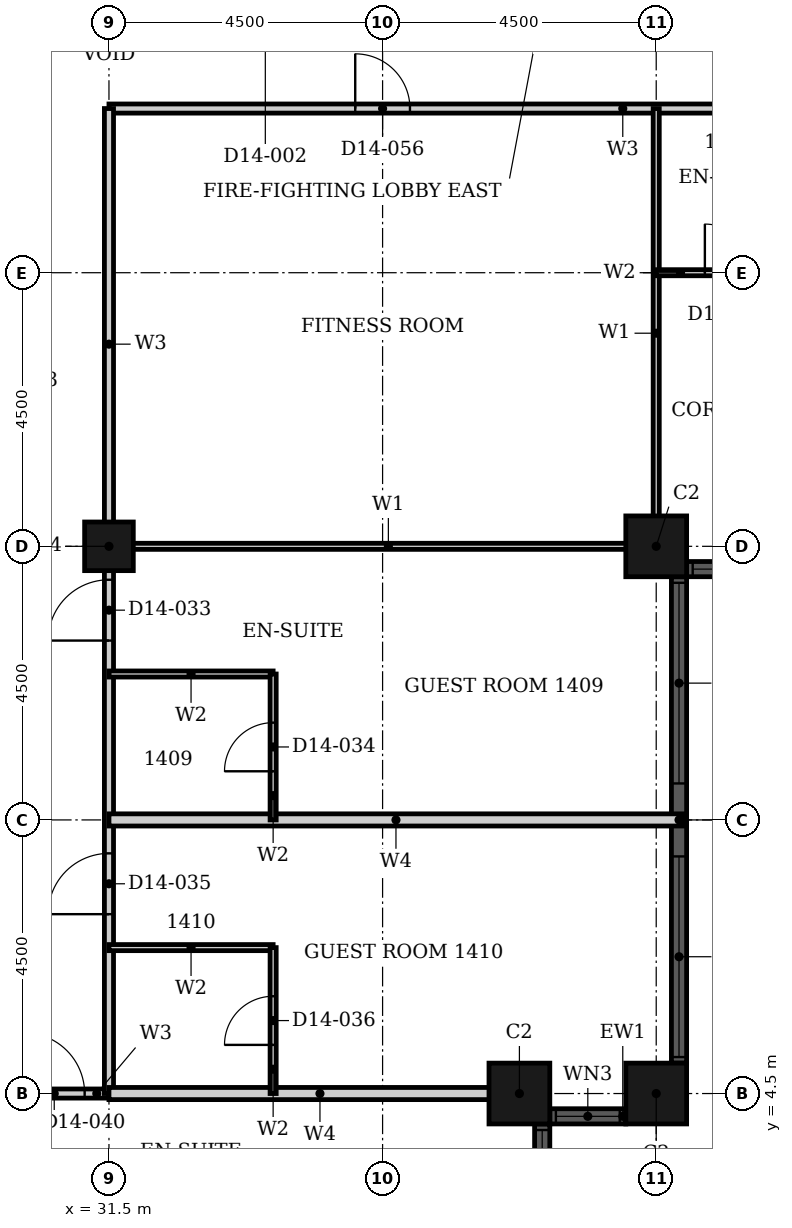
"""IFC4 building model, lengths in metres.
Left out: names, types, materials, properties, quantities, classifications, styles, units other than length and angle.
Written with IfcOpenShell. Run it as: python <this file> out.ifc"""

import sys

from ifc_helpers import new_model, si_unit, direction, frame, frame_2d, origin, origin_2d, place, context, subcontext, project, spatial, rectangle, hollow_rectangle, extrude, element, fill, save


model = new_model("IFC4")
c1 = context("Model", 3, precision=1e-05, world=origin(), true_north=direction((0.0, 1.0)))
c2 = subcontext(c1, "Body", "Model", "MODEL_VIEW")
j1 = project(units=[si_unit("LENGTHUNIT", "METRE"), si_unit("PLANEANGLEUNIT", "RADIAN")], contexts=[c1])
p1 = place(None, origin())
s1 = spatial("IfcSite", under=j1, at=p1, CompositionType="ELEMENT")
p2 = place(p1, origin())
s2 = spatial("IfcBuilding", under=s1, at=p2, CompositionType="ELEMENT")
p3 = place(p2, frame((0.0, 0.0, 63.6)))
s3 = spatial("IfcBuildingStorey", under=s2, at=p3, CompositionType="ELEMENT", Elevation=63.6)
for number, where, z_axis, x_axis in (
    (1, (38.25, 4.5, 0.0), (0.0, 0.0, 1.0), (1.0, 0.0, 0.0)),
    (2, (40.5, 4.5, 0.0), (0.0, 0.0, 1.0), (1.0, 0.0, 0.0)),
    (3, (40.5, 13.5, 0.0), (0.0, 0.0, 1.0), (1.0, 0.0, 0.0)),
):
    element("IfcColumn", number, at=place(p3, frame(where, z_axis=z_axis, x_axis=x_axis)), inside=s3, PredefinedType="COLUMN", context=c2, shape_type="SweptSolid", body=[
        extrude(hollow_rectangle(XDim=1.0, YDim=1.0, WallThickness=0.032, at=origin_2d()), origin(), (0.0, 0.0, 1.0), 3.6),
    ])
p4 = place(p3, frame((31.5, 13.5, 0.0), z_axis=(0.0, 0.0, 1.0), x_axis=(1.0, 0.0, 0.0)))
e4 = element("IfcColumn", 4, at=p4, inside=s3, PredefinedType="COLUMN", context=c2, shape_type="SweptSolid", body=[
    extrude(hollow_rectangle(XDim=0.8, YDim=0.8, WallThickness=0.025, at=origin_2d()), origin(), (0.0, 0.0, 1.0), 3.6),
])
p5 = place(p3, frame((38.625, 2.75, 0.0), z_axis=(0.0, 0.0, 1.0), x_axis=(0.0, 1.0, 0.0)))
e5 = element("IfcWall", 5, at=p5, inside=s3, PredefinedType="SOLIDWALL", context=c2, shape_type="SweptSolid", body=[
    extrude(rectangle(XDim=1.25, YDim=0.25, at=frame_2d((0.625, 0.0))), origin(), (0.0, 0.0, 1.0), 3.6),
])
p6 = place(p5, frame((0.1, 0.0, 0.9)))
e6 = element("IfcOpeningElement", 6, at=p6, cuts=e5, PredefinedType="OPENING", context=c2, shape_type="SweptSolid", body=[
    extrude(rectangle(XDim=1.05, YDim=2.08, at=frame_2d((0.525, 1.04))), frame((0.0, 0.135, 0.0), z_axis=(0.0, -1.0, 0.0), x_axis=(1.0, 0.0, 0.0)), (0.0, 0.0, 1.0), 0.27),
])
p7 = place(p3, frame((38.75, 4.125, 0.0), z_axis=(0.0, 0.0, 1.0), x_axis=(1.0, 0.0, 0.0)))
e7 = element("IfcWall", 7, at=p7, inside=s3, PredefinedType="SOLIDWALL", context=c2, shape_type="SweptSolid", body=[
    extrude(rectangle(XDim=1.25, YDim=0.25, at=frame_2d((0.625, 0.0))), origin(), (0.0, 0.0, 1.0), 3.6),
])
p8 = place(p7, frame((0.1, 0.0, 0.9)))
e8 = element("IfcOpeningElement", 8, at=p8, cuts=e7, PredefinedType="OPENING", context=c2, shape_type="SweptSolid", body=[
    extrude(rectangle(XDim=1.05, YDim=2.08, at=frame_2d((0.525, 1.04))), frame((0.0, 0.135, 0.0), z_axis=(0.0, -1.0, 0.0), x_axis=(1.0, 0.0, 0.0)), (0.0, 0.0, 1.0), 0.27),
])
p9 = place(p3, frame((40.875, 5.0, 0.0), z_axis=(0.0, 0.0, 1.0), x_axis=(0.0, 1.0, 0.0)))
e9 = element("IfcWall", 9, at=p9, inside=s3, PredefinedType="SOLIDWALL", context=c2, shape_type="SweptSolid", body=[
    extrude(rectangle(XDim=8.0, YDim=0.25, at=frame_2d((4.0, 0.0))), origin(), (0.0, 0.0, 1.0), 3.6),
])
p10 = place(p9, frame((0.1, 0.0, 0.9)))
e10 = element("IfcOpeningElement", 10, at=p10, cuts=e9, PredefinedType="OPENING", context=c2, shape_type="SweptSolid", body=[
    extrude(rectangle(XDim=3.3, YDim=2.08, at=frame_2d((1.65, 1.04))), frame((0.0, 0.135, 0.0), z_axis=(0.0, -1.0, 0.0), x_axis=(1.0, 0.0, 0.0)), (0.0, 0.0, 1.0), 0.27),
])
p11 = place(p9, frame((4.6, 0.0, 0.9)))
e11 = element("IfcOpeningElement", 11, at=p11, cuts=e9, PredefinedType="OPENING", context=c2, shape_type="SweptSolid", body=[
    extrude(rectangle(XDim=3.3, YDim=2.08, at=frame_2d((1.65, 1.04))), frame((0.0, 0.135, 0.0), z_axis=(0.0, -1.0, 0.0), x_axis=(1.0, 0.0, 0.0)), (0.0, 0.0, 1.0), 0.27),
])
p12 = place(p3, frame((41.0, 13.125, 0.0), z_axis=(0.0, 0.0, 1.0), x_axis=(1.0, 0.0, 0.0)))
e12 = element("IfcWall", 12, at=p12, inside=s3, PredefinedType="SOLIDWALL", context=c2, shape_type="SweptSolid", body=[
    extrude(rectangle(XDim=3.5, YDim=0.25, at=frame_2d((1.75, 0.0))), origin(), (0.0, 0.0, 1.0), 3.6),
])
p13 = place(p12, frame((0.1, 0.0, 0.9)))
e13 = element("IfcOpeningElement", 13, at=p13, cuts=e12, PredefinedType="OPENING", context=c2, shape_type="SweptSolid", body=[
    extrude(rectangle(XDim=3.3, YDim=2.08, at=frame_2d((1.65, 1.04))), frame((0.0, 0.135, 0.0), z_axis=(0.0, -1.0, 0.0), x_axis=(1.0, 0.0, 0.0)), (0.0, 0.0, 1.0), 0.27),
])
p14 = place(p3, frame((31.5, 20.7, 0.0), z_axis=(0.0, 0.0, 1.0), x_axis=(1.0, 0.0, 0.0)))
e14 = element("IfcWall", 14, at=p14, inside=s3, PredefinedType="PARTITIONING", context=c2, shape_type="SweptSolid", body=[
    extrude(rectangle(XDim=15.3, YDim=0.15, at=frame_2d((7.65, 0.0))), origin(), (0.0, 0.0, 1.0), 3.3),
])
p15 = place(p14, frame((11.95, 0.0, 0.0)))
e15 = element("IfcOpeningElement", 15, at=p15, cuts=e14, PredefinedType="OPENING", context=c2, shape_type="SweptSolid", body=[
    extrude(rectangle(XDim=1.0, YDim=2.1, at=frame_2d((0.5, 1.05))), frame((0.0, 0.085, 0.0), z_axis=(0.0, -1.0, 0.0), x_axis=(1.0, 0.0, 0.0)), (0.0, 0.0, 1.0), 0.17),
])
p16 = place(p14, frame((4.05, 0.0, 0.0)))
e16 = element("IfcOpeningElement", 16, at=p16, cuts=e14, PredefinedType="OPENING", context=c2, shape_type="SweptSolid", body=[
    extrude(rectangle(XDim=0.9, YDim=2.1, at=frame_2d((0.45, 1.05))), frame((0.0, 0.085, 0.0), z_axis=(0.0, -1.0, 0.0), x_axis=(1.0, 0.0, 0.0)), (0.0, 0.0, 1.0), 0.17),
])
p17 = place(p3, frame((29.7, 4.5, 0.0), z_axis=(0.0, 0.0, 1.0), x_axis=(1.0, 0.0, 0.0)))
e17 = element("IfcWall", 17, at=p17, inside=s3, PredefinedType="PARTITIONING", context=c2, shape_type="SweptSolid", body=[
    extrude(rectangle(XDim=1.8, YDim=0.15, at=frame_2d((0.9, 0.0))), origin(), (0.0, 0.0, 1.0), 3.3),
])
p18 = place(p17, frame((0.4, 0.0, 0.0)))
e18 = element("IfcOpeningElement", 18, at=p18, cuts=e17, PredefinedType="OPENING", context=c2, shape_type="SweptSolid", body=[
    extrude(rectangle(XDim=1.0, YDim=2.1, at=frame_2d((0.5, 1.05))), frame((0.0, 0.085, 0.0), z_axis=(0.0, -1.0, 0.0), x_axis=(1.0, 0.0, 0.0)), (0.0, 0.0, 1.0), 0.17),
])
p19 = place(p3, frame((31.5, 4.5, 0.0), z_axis=(0.0, 0.0, 1.0), x_axis=(0.0, 1.0, 0.0)))
e19 = element("IfcWall", 19, at=p19, inside=s3, PredefinedType="PARTITIONING", context=c2, shape_type="SweptSolid", body=[
    extrude(rectangle(XDim=16.2, YDim=0.15, at=frame_2d((8.1, 0.0))), origin(), (0.0, 0.0, 1.0), 2.58),
])
p20 = place(p19, frame((7.45, 0.0, 0.0)))
e20 = element("IfcOpeningElement", 20, at=p20, cuts=e19, PredefinedType="OPENING", context=c2, shape_type="SweptSolid", body=[
    extrude(rectangle(XDim=1.0, YDim=2.1, at=frame_2d((0.5, 1.05))), frame((0.0, 0.085, 0.0), z_axis=(0.0, -1.0, 0.0), x_axis=(1.0, 0.0, 0.0)), (0.0, 0.0, 1.0), 0.17),
])
p21 = place(p19, frame((2.95, 0.0, 0.0)))
e21 = element("IfcOpeningElement", 21, at=p21, cuts=e19, PredefinedType="OPENING", context=c2, shape_type="SweptSolid", body=[
    extrude(rectangle(XDim=1.0, YDim=2.1, at=frame_2d((0.5, 1.05))), frame((0.0, 0.085, 0.0), z_axis=(0.0, -1.0, 0.0), x_axis=(1.0, 0.0, 0.0)), (0.0, 0.0, 1.0), 0.17),
])
p22 = place(p3, frame((31.5, 13.5, 0.0), z_axis=(0.0, 0.0, 1.0), x_axis=(1.0, 0.0, 0.0)))
e22 = element("IfcWall", 22, at=p22, inside=s3, PredefinedType="PARTITIONING", context=c2, shape_type="SweptSolid", body=[
    extrude(rectangle(XDim=9.19, YDim=0.1, at=frame_2d((4.595, 0.0))), origin(), (0.0, 0.0, 1.0), 2.38),
])
p23 = place(p3, frame((40.5, 13.31, 0.0), z_axis=(0.0, 0.0, 1.0), x_axis=(0.0, 1.0, 0.0)))
e23 = element("IfcWall", 23, at=p23, inside=s3, PredefinedType="PARTITIONING", context=c2, shape_type="SweptSolid", body=[
    extrude(rectangle(XDim=7.39, YDim=0.1, at=frame_2d((3.695, 0.0))), origin(), (0.0, 0.0, 1.0), 3.3),
])
p24 = place(p3, frame((31.5, 4.5, 0.0), z_axis=(0.0, 0.0, 1.0), x_axis=(1.0, 0.0, 0.0)))
e24 = element("IfcWall", 24, at=p24, inside=s3, PredefinedType="PARTITIONING", context=c2, shape_type="SweptSolid", body=[
    extrude(rectangle(XDim=6.94, YDim=0.2, at=frame_2d((3.47, 0.0))), origin(), (0.0, 0.0, 1.0), 3.3),
])
p25 = place(p3, frame((31.5, 9.0, 0.0), z_axis=(0.0, 0.0, 1.0), x_axis=(1.0, 0.0, 0.0)))
e25 = element("IfcWall", 25, at=p25, inside=s3, PredefinedType="PARTITIONING", context=c2, shape_type="SweptSolid", body=[
    extrude(rectangle(XDim=9.44, YDim=0.2, at=frame_2d((4.72, 0.0))), origin(), (0.0, 0.0, 1.0), 3.3),
])
p26 = place(p3, frame((31.5, 11.4, 0.0), z_axis=(0.0, 0.0, 1.0), x_axis=(1.0, 0.0, 0.0)))
e26 = element("IfcWall", 26, at=p26, inside=s3, PredefinedType="PARTITIONING", context=c2, shape_type="SweptSolid", body=[
    extrude(rectangle(XDim=2.7, YDim=0.1, at=frame_2d((1.35, 0.0))), origin(), (0.0, 0.0, 1.0), 3.3),
])
p27 = place(p3, frame((40.5, 18.0, 0.0), z_axis=(0.0, 0.0, 1.0), x_axis=(1.0, 0.0, 0.0)))
e27 = element("IfcWall", 27, at=p27, inside=s3, PredefinedType="PARTITIONING", context=c2, shape_type="SweptSolid", body=[
    extrude(rectangle(XDim=2.4, YDim=0.1, at=frame_2d((1.2, 0.0))), origin(), (0.0, 0.0, 1.0), 3.3),
])
p28 = place(p27, frame((0.8, 0.0, 0.0)))
e28 = element("IfcOpeningElement", 28, at=p28, cuts=e27, PredefinedType="OPENING", context=c2, shape_type="SweptSolid", body=[
    extrude(rectangle(XDim=0.8, YDim=2.1, at=frame_2d((0.4, 1.05))), frame((0.0, 0.06, 0.0), z_axis=(0.0, -1.0, 0.0), x_axis=(1.0, 0.0, 0.0)), (0.0, 0.0, 1.0), 0.12),
])
p29 = place(p3, frame((31.5, 6.9, 0.0), z_axis=(0.0, 0.0, 1.0), x_axis=(1.0, 0.0, 0.0)))
e29 = element("IfcWall", 29, at=p29, inside=s3, PredefinedType="PARTITIONING", context=c2, shape_type="SweptSolid", body=[
    extrude(rectangle(XDim=2.7, YDim=0.1, at=frame_2d((1.35, 0.0))), origin(), (0.0, 0.0, 1.0), 3.3),
])
p30 = place(p3, frame((34.2, 9.0, 0.0), z_axis=(0.0, 0.0, 1.0), x_axis=(0.0, 1.0, 0.0)))
e30 = element("IfcWall", 30, at=p30, inside=s3, PredefinedType="PARTITIONING", context=c2, shape_type="SweptSolid", body=[
    extrude(rectangle(XDim=2.4, YDim=0.1, at=frame_2d((1.2, 0.0))), origin(), (0.0, 0.0, 1.0), 3.3),
])
p31 = place(p30, frame((0.8, 0.0, 0.0)))
e31 = element("IfcOpeningElement", 31, at=p31, cuts=e30, PredefinedType="OPENING", context=c2, shape_type="SweptSolid", body=[
    extrude(rectangle(XDim=0.8, YDim=2.1, at=frame_2d((0.4, 1.05))), frame((0.0, 0.06, 0.0), z_axis=(0.0, -1.0, 0.0), x_axis=(1.0, 0.0, 0.0)), (0.0, 0.0, 1.0), 0.12),
])
p32 = place(p3, frame((34.2, 4.5, 0.0), z_axis=(0.0, 0.0, 1.0), x_axis=(0.0, 1.0, 0.0)))
e32 = element("IfcWall", 32, at=p32, inside=s3, PredefinedType="PARTITIONING", context=c2, shape_type="SweptSolid", body=[
    extrude(rectangle(XDim=2.4, YDim=0.1, at=frame_2d((1.2, 0.0))), origin(), (0.0, 0.0, 1.0), 3.3),
])
p33 = place(p32, frame((0.8, 0.0, 0.0)))
e33 = element("IfcOpeningElement", 33, at=p33, cuts=e32, PredefinedType="OPENING", context=c2, shape_type="SweptSolid", body=[
    extrude(rectangle(XDim=0.8, YDim=2.1, at=frame_2d((0.4, 1.05))), frame((0.0, 0.06, 0.0), z_axis=(0.0, -1.0, 0.0), x_axis=(1.0, 0.0, 0.0)), (0.0, 0.0, 1.0), 0.12),
])
p34 = place(p6, origin())
e34 = element("IfcWindow", 34, at=p34, inside=s3, PartitioningType="SINGLE_PANEL", PredefinedType="WINDOW", context=c2, shape_type="SweptSolid", body=[
    extrude(rectangle(XDim=1.05, YDim=2.08, at=frame_2d((0.525, 1.04))), frame((0.0, 0.03, 0.0), z_axis=(0.0, -1.0, 0.0), x_axis=(1.0, 0.0, 0.0)), (0.0, 0.0, 1.0), 0.06),
])
fill(e6, e34)
p35 = place(p8, origin())
e35 = element("IfcWindow", 35, at=p35, inside=s3, PartitioningType="SINGLE_PANEL", PredefinedType="WINDOW", context=c2, shape_type="SweptSolid", body=[
    extrude(rectangle(XDim=1.05, YDim=2.08, at=frame_2d((0.525, 1.04))), frame((0.0, 0.03, 0.0), z_axis=(0.0, -1.0, 0.0), x_axis=(1.0, 0.0, 0.0)), (0.0, 0.0, 1.0), 0.06),
])
fill(e8, e35)
p36 = place(p10, origin())
e36 = element("IfcWindow", 36, at=p36, inside=s3, PartitioningType="SINGLE_PANEL", PredefinedType="WINDOW", context=c2, shape_type="SweptSolid", body=[
    extrude(rectangle(XDim=3.3, YDim=2.08, at=frame_2d((1.65, 1.04))), frame((0.0, 0.03, 0.0), z_axis=(0.0, -1.0, 0.0), x_axis=(1.0, 0.0, 0.0)), (0.0, 0.0, 1.0), 0.06),
])
fill(e10, e36)
p37 = place(p11, origin())
e37 = element("IfcWindow", 37, at=p37, inside=s3, PartitioningType="SINGLE_PANEL", PredefinedType="WINDOW", context=c2, shape_type="SweptSolid", body=[
    extrude(rectangle(XDim=3.3, YDim=2.08, at=frame_2d((1.65, 1.04))), frame((0.0, 0.03, 0.0), z_axis=(0.0, -1.0, 0.0), x_axis=(1.0, 0.0, 0.0)), (0.0, 0.0, 1.0), 0.06),
])
fill(e11, e37)
p38 = place(p13, origin())
e38 = element("IfcWindow", 38, at=p38, inside=s3, PartitioningType="SINGLE_PANEL", PredefinedType="WINDOW", context=c2, shape_type="SweptSolid", body=[
    extrude(rectangle(XDim=3.3, YDim=2.08, at=frame_2d((1.65, 1.04))), frame((0.0, 0.03, 0.0), z_axis=(0.0, -1.0, 0.0), x_axis=(1.0, 0.0, 0.0)), (0.0, 0.0, 1.0), 0.06),
])
fill(e13, e38)
p39 = place(p20, origin())
e39 = element("IfcDoor", 39, at=p39, inside=s3, OperationType="SINGLE_SWING_RIGHT", PredefinedType="DOOR", context=c2, shape_type="SweptSolid", body=[
    extrude(rectangle(XDim=1.0, YDim=2.1, at=frame_2d((0.5, 1.05))), frame((0.0, 0.025, 0.0), z_axis=(0.0, -1.0, 0.0), x_axis=(1.0, 0.0, 0.0)), (0.0, 0.0, 1.0), 0.05),
])
fill(e20, e39)
p40 = place(p31, origin())
e40 = element("IfcDoor", 40, at=p40, inside=s3, OperationType="SINGLE_SWING_LEFT", PredefinedType="DOOR", context=c2, shape_type="SweptSolid", body=[
    extrude(rectangle(XDim=0.8, YDim=2.1, at=frame_2d((0.4, 1.05))), frame((0.0, 0.025, 0.0), z_axis=(0.0, -1.0, 0.0), x_axis=(1.0, 0.0, 0.0)), (0.0, 0.0, 1.0), 0.05),
])
fill(e31, e40)
p41 = place(p21, origin())
e41 = element("IfcDoor", 41, at=p41, inside=s3, OperationType="SINGLE_SWING_RIGHT", PredefinedType="DOOR", context=c2, shape_type="SweptSolid", body=[
    extrude(rectangle(XDim=1.0, YDim=2.1, at=frame_2d((0.5, 1.05))), frame((0.0, 0.025, 0.0), z_axis=(0.0, -1.0, 0.0), x_axis=(1.0, 0.0, 0.0)), (0.0, 0.0, 1.0), 0.05),
])
fill(e21, e41)
p42 = place(p33, origin())
e42 = element("IfcDoor", 42, at=p42, inside=s3, OperationType="SINGLE_SWING_LEFT", PredefinedType="DOOR", context=c2, shape_type="SweptSolid", body=[
    extrude(rectangle(XDim=0.8, YDim=2.1, at=frame_2d((0.4, 1.05))), frame((0.0, 0.025, 0.0), z_axis=(0.0, -1.0, 0.0), x_axis=(1.0, 0.0, 0.0)), (0.0, 0.0, 1.0), 0.05),
])
fill(e33, e42)
p43 = place(p18, origin())
e43 = element("IfcDoor", 43, at=p43, inside=s3, OperationType="SINGLE_SWING_LEFT", PredefinedType="DOOR", context=c2, shape_type="SweptSolid", body=[
    extrude(rectangle(XDim=1.0, YDim=2.1, at=frame_2d((0.5, 1.05))), frame((0.0, 0.025, 0.0), z_axis=(0.0, -1.0, 0.0), x_axis=(1.0, 0.0, 0.0)), (0.0, 0.0, 1.0), 0.05),
])
fill(e18, e43)
p44 = place(p28, origin())
e44 = element("IfcDoor", 44, at=p44, inside=s3, OperationType="SINGLE_SWING_RIGHT", PredefinedType="DOOR", context=c2, shape_type="SweptSolid", body=[
    extrude(rectangle(XDim=0.8, YDim=2.1, at=frame_2d((0.4, 1.05))), frame((0.0, 0.025, 0.0), z_axis=(0.0, -1.0, 0.0), x_axis=(1.0, 0.0, 0.0)), (0.0, 0.0, 1.0), 0.05),
])
fill(e28, e44)
p45 = place(p16, origin())
e45 = element("IfcDoor", 45, at=p45, inside=s3, OperationType="SINGLE_SWING_LEFT", PredefinedType="DOOR", context=c2, shape_type="SweptSolid", body=[
    extrude(rectangle(XDim=0.9, YDim=2.1, at=frame_2d((0.45, 1.05))), frame((0.0, 0.025, 0.0), z_axis=(0.0, -1.0, 0.0), x_axis=(1.0, 0.0, 0.0)), (0.0, 0.0, 1.0), 0.05),
])
fill(e16, e45)
save(model, sys.argv[1])
